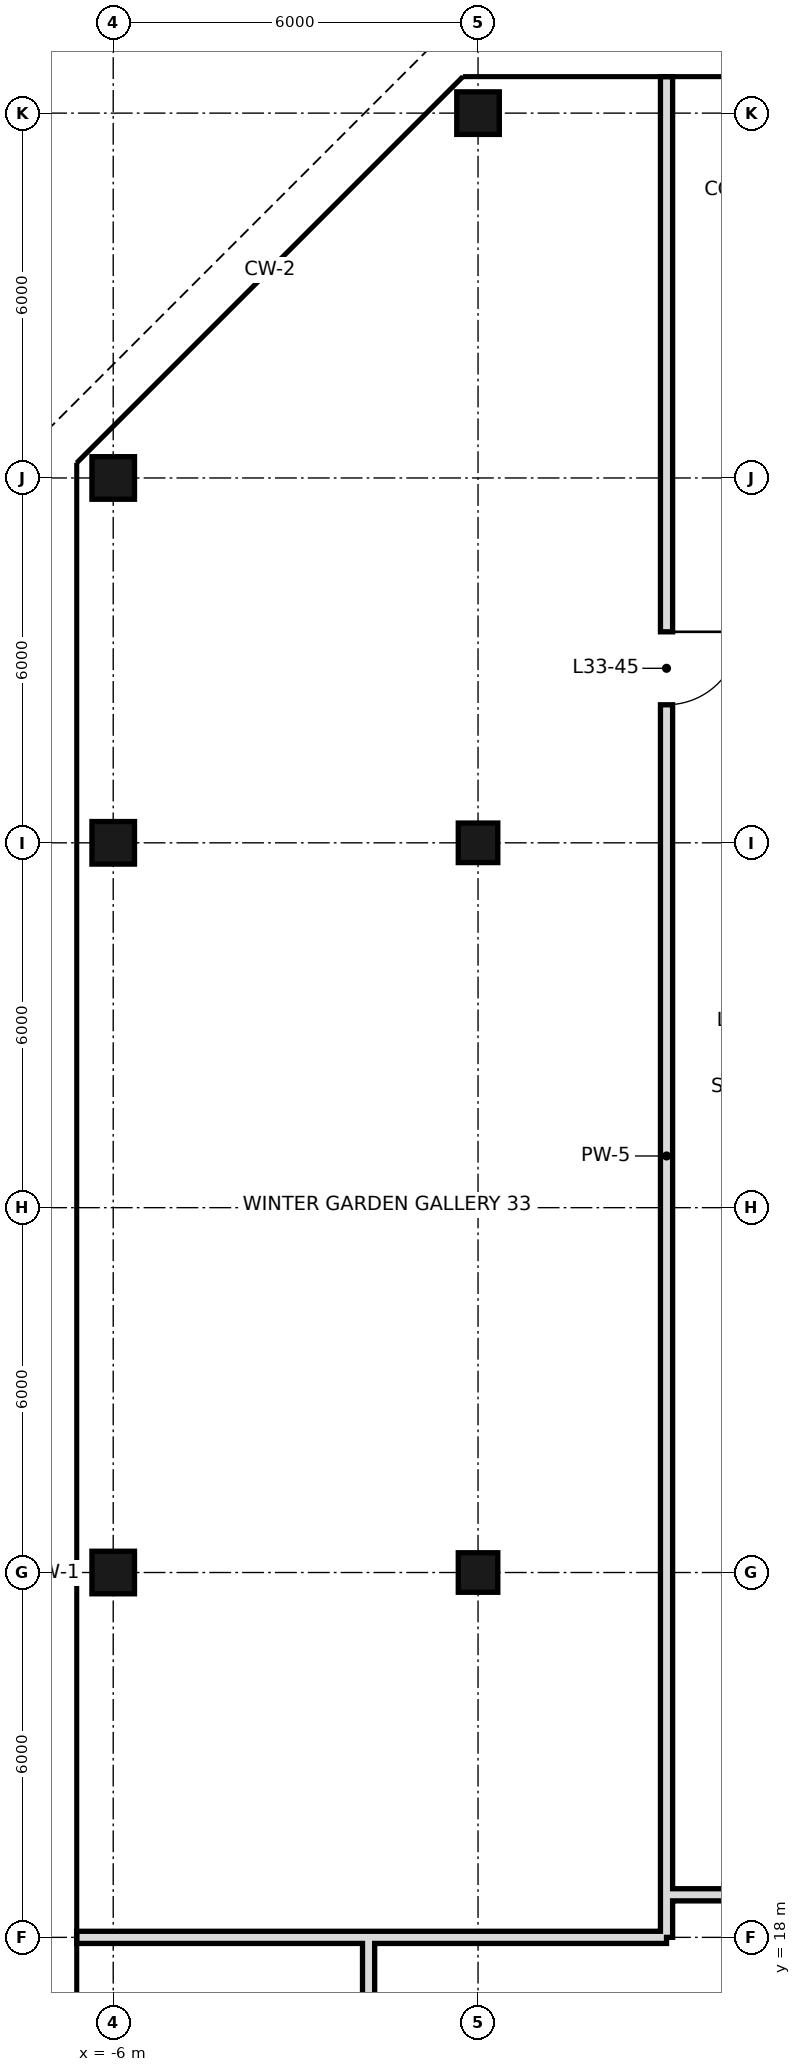
"""IFC4 building model, lengths in metres.
Left out: names, types, materials, properties, quantities, classifications, styles, units other than length and angle.
Written with IfcOpenShell. Run it as: python <this file> out.ifc"""

import sys

from ifc_helpers import new_model, si_unit, direction, frame, frame_2d, origin, origin_2d, place, context, subcontext, project, spatial, rectangle, hollow_rectangle, extrude, element, fill, save


model = new_model("IFC4")
c1 = context("Model", 3, precision=1e-05, world=origin(), true_north=direction((0.0, 1.0)))
c2 = subcontext(c1, "Body", "Model", "MODEL_VIEW")
j1 = project(units=[si_unit("LENGTHUNIT", "METRE"), si_unit("PLANEANGLEUNIT", "RADIAN")], contexts=[c1])
p1 = place(None, origin())
s1 = spatial("IfcSite", under=j1, at=p1, CompositionType="ELEMENT")
p2 = place(p1, origin())
s2 = spatial("IfcBuilding", under=s1, at=p2, CompositionType="ELEMENT")
p3 = place(p2, frame((0.0, 0.0, 147.4)))
s3 = spatial("IfcBuildingStorey", under=s2, at=p3, CompositionType="ELEMENT", Elevation=147.4)
for number, where, z_axis, x_axis in (
    (1, (-6.0, 24.0, 0.0), (0.0, 0.0, 1.0), (1.0, 0.0, 0.0)),
    (2, (-6.0, 36.0, 0.0), (0.0, 0.0, 1.0), (1.0, 0.0, 0.0)),
    (3, (-6.0, 42.0, 0.0), (0.0, 0.0, 1.0), (1.0, 0.0, 0.0)),
):
    element("IfcColumn", number, at=place(p3, frame(where, z_axis=z_axis, x_axis=x_axis)), inside=s3, PredefinedType="COLUMN", context=c2, shape_type="SweptSolid", body=[
        extrude(hollow_rectangle(XDim=0.7, YDim=0.7, WallThickness=0.036, at=origin_2d()), origin(), (0.0, 0.0, 1.0), 3.6),
    ])
for number, where, z_axis, x_axis in (
    (4, (0.0, 24.0, 0.0), (0.0, 0.0, 1.0), (1.0, 0.0, 0.0)),
    (5, (0.0, 36.0, 0.0), (0.0, 0.0, 1.0), (1.0, 0.0, 0.0)),
):
    element("IfcColumn", number, at=place(p3, frame(where, z_axis=z_axis, x_axis=x_axis)), inside=s3, PredefinedType="COLUMN", context=c2, shape_type="SweptSolid", body=[
        extrude(hollow_rectangle(XDim=0.65, YDim=0.65, WallThickness=0.032, at=origin_2d()), origin(), (0.0, 0.0, 1.0), 3.6),
    ])
p4 = place(p3, frame((0.0, 48.0, 0.0), z_axis=(0.0, 0.0, 1.0), x_axis=(1.0, 0.0, 0.0)))
e6 = element("IfcColumn", 6, at=p4, inside=s3, PredefinedType="COLUMN", context=c2, shape_type="SweptSolid", body=[
    extrude(hollow_rectangle(XDim=0.7, YDim=0.7, WallThickness=0.036, at=origin_2d()), origin(), (0.0, 0.0, 1.0), 3.6),
])
p5 = place(p3, frame((-1.8, 10.8, 0.0), z_axis=(0.0, 0.0, 1.0), x_axis=(0.0, 1.0, 0.0)))
e7 = element("IfcWall", 7, at=p5, inside=s3, PredefinedType="SOLIDWALL", context=c2, shape_type="SweptSolid", body=[
    extrude(rectangle(XDim=7.2, YDim=0.2, at=frame_2d((3.6, 0.0))), origin(), (0.0, 0.0, 1.0), 3.42),
])
p6 = place(p3, frame((3.1, 18.0, 0.0), z_axis=(0.0, 0.0, 1.0), x_axis=(0.0, 1.0, 0.0)))
e8 = element("IfcWall", 8, at=p6, inside=s3, PredefinedType="SOLIDWALL", context=c2, shape_type="SweptSolid", body=[
    extrude(rectangle(XDim=30.6, YDim=0.2, at=frame_2d((15.3, 0.0))), origin(), (0.0, 0.0, 1.0), 2.72),
])
p7 = place(p6, frame((20.27, 0.0, 0.0)))
e9 = element("IfcOpeningElement", 9, at=p7, cuts=e8, PredefinedType="OPENING", context=c2, shape_type="SweptSolid", body=[
    extrude(rectangle(XDim=1.2, YDim=2.4, at=frame_2d((0.6, 1.2))), frame((0.0, 0.11, 0.0), z_axis=(0.0, -1.0, 0.0), x_axis=(1.0, 0.0, 0.0)), (0.0, 0.0, 1.0), 0.22),
])
p8 = place(p3, frame((-1.8, 18.0, 0.0), z_axis=(0.0, 0.0, 1.0), x_axis=(1.0, 0.0, 0.0)))
e10 = element("IfcWall", 10, at=p8, inside=s3, PredefinedType="SOLIDWALL", context=c2, shape_type="SweptSolid", body=[
    extrude(rectangle(XDim=4.9, YDim=0.2, at=frame_2d((2.45, 0.0))), origin(), (0.0, 0.0, 1.0), 2.72),
])
p9 = place(p3, frame((-6.6, 18.0, 0.0), z_axis=(0.0, 0.0, 1.0), x_axis=(1.0, 0.0, 0.0)))
e11 = element("IfcWall", 11, at=p9, inside=s3, PredefinedType="SOLIDWALL", context=c2, shape_type="SweptSolid", body=[
    extrude(rectangle(XDim=4.8, YDim=0.2, at=frame_2d((2.4, 0.0))), origin(), (0.0, 0.0, 1.0), 2.72),
])
p10 = place(p3, frame((3.1, 18.7, 0.0), z_axis=(0.0, 0.0, 1.0), x_axis=(1.0, 0.0, 0.0)))
e12 = element("IfcWall", 12, at=p10, inside=s3, PredefinedType="SOLIDWALL", context=c2, shape_type="SweptSolid", body=[
    extrude(rectangle(XDim=41.8, YDim=0.2, at=frame_2d((20.9, 0.0))), origin(), (0.0, 0.0, 1.0), 2.72),
])
p11 = place(p10, frame((5.64, 0.0, 0.0)))
e13 = element("IfcOpeningElement", 13, at=p11, cuts=e12, PredefinedType="OPENING", context=c2, shape_type="SweptSolid", body=[
    extrude(rectangle(XDim=1.2, YDim=2.4, at=frame_2d((0.6, 1.2))), frame((0.0, 0.11, 0.0), z_axis=(0.0, -1.0, 0.0), x_axis=(1.0, 0.0, 0.0)), (0.0, 0.0, 1.0), 0.22),
])
p12 = place(p10, frame((24.16, 0.0, 0.0)))
e14 = element("IfcOpeningElement", 14, at=p12, cuts=e12, PredefinedType="OPENING", context=c2, shape_type="SweptSolid", body=[
    extrude(rectangle(XDim=1.2, YDim=2.4, at=frame_2d((0.6, 1.2))), frame((0.0, 0.11, 0.0), z_axis=(0.0, -1.0, 0.0), x_axis=(1.0, 0.0, 0.0)), (0.0, 0.0, 1.0), 0.22),
])
p13 = place(p7, origin())
e15 = element("IfcDoor", 15, at=p13, inside=s3, OperationType="SINGLE_SWING_RIGHT", PredefinedType="DOOR", context=c2, shape_type="SweptSolid", body=[
    extrude(rectangle(XDim=1.2, YDim=2.4, at=frame_2d((0.6, 1.2))), frame((0.0, 0.025, 0.0), z_axis=(0.0, -1.0, 0.0), x_axis=(1.0, 0.0, 0.0)), (0.0, 0.0, 1.0), 0.05),
])
fill(e9, e15)
save(model, sys.argv[1])
